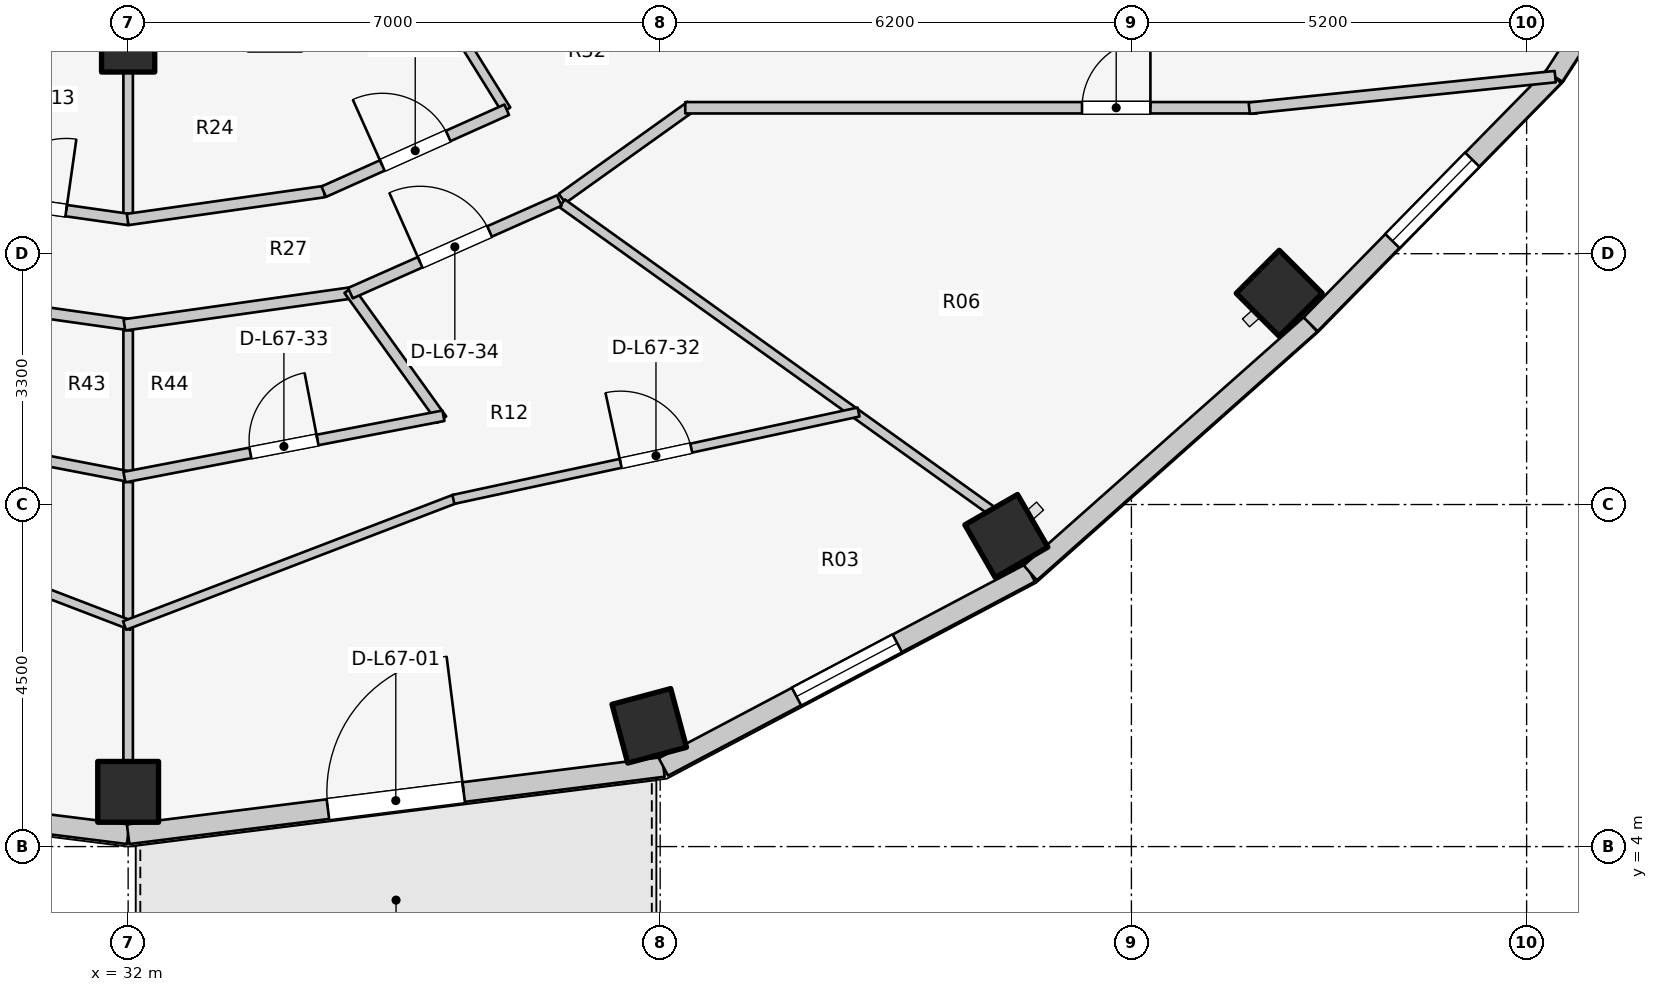
"""IFC4 building model, lengths in metres.
Left out: names, types, materials, properties, quantities, classifications, styles, units other than length and angle.
Written with IfcOpenShell. Run it as: python <this file> out.ifc"""

import sys

from ifc_helpers import new_model, si_unit, direction, frame, frame_2d, origin, origin_2d, place, context, subcontext, project, spatial, rectangle, extrude, element, fill, save


model = new_model("IFC4")
c1 = context("Model", 3, precision=1e-05, world=origin(), true_north=direction((0.0, 1.0)))
c2 = subcontext(c1, "Body", "Model", "MODEL_VIEW")
j1 = project(units=[si_unit("LENGTHUNIT", "METRE"), si_unit("PLANEANGLEUNIT", "RADIAN")], contexts=[c1])
p1 = place(None, origin())
s1 = spatial("IfcSite", under=j1, at=p1, CompositionType="ELEMENT")
p2 = place(p1, origin())
s2 = spatial("IfcBuilding", under=s1, at=p2, CompositionType="ELEMENT")
p3 = place(p2, frame((0.0, 0.0, 220.2)))
s3 = spatial("IfcBuildingStorey", under=s2, at=p3, CompositionType="ELEMENT", Elevation=220.2)
p4 = place(p3, frame((32.0, 14.54, 0.0), z_axis=(0.0, 0.0, 1.0), x_axis=(1.0, 0.0, 0.0)))
e1 = element("IfcColumn", 1, at=p4, inside=s3, PredefinedType="COLUMN", context=c2, shape_type="SweptSolid", body=[
    extrude(rectangle(XDim=0.7, YDim=0.7, at=origin_2d()), origin(), (0.0, 0.0, 1.0), 3.1),
])
for number, where, z_axis, x_axis in (
    (2, (32.0, 4.72, 0.0), (0.0, 0.0, 1.0), (0.0, -1.0, 0.0)),
    (3, (38.856, 5.589, 0.0), (0.0, 0.0, 1.0), (0.259, -0.966, 0.0)),
    (4, (43.555, 8.086, 0.0), (0.0, 0.0, 1.0), (0.5, -0.866, 0.0)),
    (5, (47.145, 11.279, 0.0), (0.0, 0.0, 1.0), (0.707, -0.707, 0.0)),
):
    element("IfcColumn", number, at=place(p3, frame(where, z_axis=z_axis, x_axis=x_axis)), inside=s3, PredefinedType="COLUMN", context=c2, shape_type="SweptSolid", body=[
        extrude(rectangle(XDim=0.8, YDim=0.8, at=origin_2d()), origin(), (0.0, 0.0, 1.0), 3.1),
    ])
p5 = place(p3, frame((24.957, 5.048, 0.0), z_axis=(0.0, 0.0, 1.0), x_axis=(0.992180211307, -0.124813574142, 0.0)))
e6 = element("IfcWall", 6, at=p5, inside=s3, PredefinedType="STANDARD", context=c2, shape_type="SweptSolid", body=[
    extrude(rectangle(XDim=7.098, YDim=0.26, at=frame_2d((3.549, 0.0))), origin(), (0.0, 0.0, 1.0), 2.85),
])
p6 = place(p5, frame((2.349, 0.0, 0.75)))
e7 = element("IfcOpeningElement", 7, at=p6, cuts=e6, PredefinedType="OPENING", context=c2, shape_type="SweptSolid", body=[
    extrude(rectangle(XDim=2.4, YDim=1.7, at=frame_2d((1.2, 0.85))), frame((0.0, 0.14, 0.0), z_axis=(0.0, -1.0, 0.0), x_axis=(1.0, 0.0, 0.0)), (0.0, 0.0, 1.0), 0.28),
])
p7 = place(p3, frame((32.0, 4.162, 0.0), z_axis=(0.0, 0.0, 1.0), x_axis=(0.992180211307, 0.124813574142, 0.0)))
e8 = element("IfcWall", 8, at=p7, inside=s3, PredefinedType="STANDARD", context=c2, shape_type="SweptSolid", body=[
    extrude(rectangle(XDim=7.098, YDim=0.26, at=frame_2d((3.549, 0.0))), origin(), (0.0, 0.0, 1.0), 2.88),
])
p8 = place(p7, frame((2.649, 0.0, 0.0)))
e9 = element("IfcOpeningElement", 9, at=p8, cuts=e8, PredefinedType="OPENING", context=c2, shape_type="SweptSolid", body=[
    extrude(rectangle(XDim=1.8, YDim=2.35, at=frame_2d((0.9, 1.175))), frame((0.0, 0.14, 0.0), z_axis=(0.0, -1.0, 0.0), x_axis=(1.0, 0.0, 0.0)), (0.0, 0.0, 1.0), 0.28),
])
p9 = place(p3, frame((39.043, 5.048, 0.0), z_axis=(0.0, 0.0, 1.0), x_axis=(0.884000981341, 0.46748504253, 0.0)))
e10 = element("IfcWall", 10, at=p9, inside=s3, PredefinedType="STANDARD", context=c2, shape_type="SweptSolid", body=[
    extrude(rectangle(XDim=5.46, YDim=0.26, at=frame_2d((2.73, 0.0))), origin(), (0.0, 0.0, 1.0), 2.85),
])
p10 = place(p9, frame((1.98, 0.0, 0.75)))
e11 = element("IfcOpeningElement", 11, at=p10, cuts=e10, PredefinedType="OPENING", context=c2, shape_type="SweptSolid", body=[
    extrude(rectangle(XDim=1.5, YDim=1.6, at=frame_2d((0.75, 0.8))), frame((0.0, 0.14, 0.0), z_axis=(0.0, -1.0, 0.0), x_axis=(1.0, 0.0, 0.0)), (0.0, 0.0, 1.0), 0.28),
])
p11 = place(p3, frame((43.87, 7.601, 0.0), z_axis=(0.0, 0.0, 1.0), x_axis=(0.748165854006, 0.663511759428, 0.0)))
e12 = element("IfcWall", 12, at=p11, inside=s3, PredefinedType="STANDARD", context=c2, shape_type="SweptSolid", body=[
    extrude(rectangle(XDim=4.929, YDim=0.26, at=frame_2d((2.464, 0.0))), origin(), (0.0, 0.0, 1.0), 2.85),
])
p12 = place(p3, frame((47.558, 10.871, 0.0), z_axis=(0.0, 0.0, 1.0), x_axis=(0.700642973333, 0.713512034881, 0.0)))
e13 = element("IfcWall", 13, at=p12, inside=s3, PredefinedType="STANDARD", context=c2, shape_type="SweptSolid", body=[
    extrude(rectangle(XDim=4.572, YDim=0.26, at=frame_2d((2.286, 0.0))), origin(), (0.0, 0.0, 1.0), 2.85),
])
p13 = place(p12, frame((1.536, 0.0, 0.75)))
e14 = element("IfcOpeningElement", 14, at=p13, cuts=e13, PredefinedType="OPENING", context=c2, shape_type="SweptSolid", body=[
    extrude(rectangle(XDim=1.5, YDim=1.6, at=frame_2d((0.75, 0.8))), frame((0.0, 0.14, 0.0), z_axis=(0.0, -1.0, 0.0), x_axis=(1.0, 0.0, 0.0)), (0.0, 0.0, 1.0), 0.28),
])
p14 = place(p3, frame((50.761, 14.133, 0.0), z_axis=(0.0, 0.0, 1.0), x_axis=(0.542641766008, 0.839964233634, 0.0)))
e15 = element("IfcWall", 15, at=p14, inside=s3, PredefinedType="STANDARD", context=c2, shape_type="SweptSolid", body=[
    extrude(rectangle(XDim=4.319, YDim=0.26, at=frame_2d((2.16, 0.0))), origin(), (0.0, 0.0, 1.0), 2.85),
])
p15 = place(p14, frame((1.41, 0.0, 0.75)))
e16 = element("IfcOpeningElement", 16, at=p15, cuts=e15, PredefinedType="OPENING", context=c2, shape_type="SweptSolid", body=[
    extrude(rectangle(XDim=1.5, YDim=1.6, at=frame_2d((0.75, 0.8))), frame((0.0, 0.14, 0.0), z_axis=(0.0, -1.0, 0.0), x_axis=(1.0, 0.0, 0.0)), (0.0, 0.0, 1.0), 0.28),
])
p16 = place(p3, frame((32.0, 14.9, 0.0), z_axis=(0.0, 0.0, 1.0), x_axis=(0.0, -1.0, 0.0)))
e17 = element("IfcWall", 17, at=p16, inside=s3, PredefinedType="PARTITIONING", context=c2, shape_type="SweptSolid", body=[
    extrude(rectangle(XDim=2.65, YDim=0.125, at=frame_2d((1.325, 0.0))), origin(), (0.0, 0.0, 1.0), 2.376),
])
p17 = place(p3, frame((35.55, 15.985, 0.0), z_axis=(0.0, 0.0, 1.0), x_axis=(0.527527080983, -0.849538215049, 0.0)))
e18 = element("IfcWall", 18, at=p17, inside=s3, PredefinedType="PARTITIONING", context=c2, shape_type="SweptSolid", body=[
    extrude(rectangle(XDim=2.701, YDim=0.125, at=frame_2d((1.351, 0.0))), origin(), (0.0, 0.0, 1.0), 2.376),
])
p18 = place(p3, frame((29.423, 12.617, 0.0), z_axis=(0.0, 0.0, 1.0), x_axis=(0.990078185178, -0.140517569133, 0.0)))
e19 = element("IfcWall", 19, at=p18, inside=s3, PredefinedType="PARTITIONING", context=c2, shape_type="SweptSolid", body=[
    extrude(rectangle(XDim=2.61, YDim=0.15, at=frame_2d((1.305, 0.0))), origin(), (0.0, 0.0, 1.0), 2.376),
])
p19 = place(p18, frame((0.83, 0.0, 0.0)))
e20 = element("IfcOpeningElement", 20, at=p19, cuts=e19, PredefinedType="OPENING", context=c2, shape_type="SweptSolid", body=[
    extrude(rectangle(XDim=0.95, YDim=2.1, at=frame_2d((0.475, 1.05))), frame((0.0, 0.085, 0.0), z_axis=(0.0, -1.0, 0.0), x_axis=(1.0, 0.0, 0.0)), (0.0, 0.0, 1.0), 0.17),
])
p20 = place(p3, frame((31.993, 12.25, 0.0), z_axis=(0.0, 0.0, 1.0), x_axis=(0.990078185178, 0.140517569133, 0.0)))
e21 = element("IfcWall", 21, at=p20, inside=s3, PredefinedType="PARTITIONING", context=c2, shape_type="SweptSolid", body=[
    extrude(rectangle(XDim=2.61, YDim=0.15, at=frame_2d((1.305, 0.0))), origin(), (0.0, 0.0, 1.0), 2.376),
])
p21 = place(p3, frame((34.573, 12.616, 0.0), z_axis=(0.0, 0.0, 1.0), x_axis=(0.912628408652, 0.408790151203, 0.0)))
e22 = element("IfcWall", 22, at=p21, inside=s3, PredefinedType="PARTITIONING", context=c2, shape_type="SweptSolid", body=[
    extrude(rectangle(XDim=2.638, YDim=0.15, at=frame_2d((1.319, 0.0))), origin(), (0.0, 0.0, 1.0), 2.376),
])
p22 = place(p21, frame((0.844, 0.0, 0.0)))
e23 = element("IfcOpeningElement", 23, at=p22, cuts=e22, PredefinedType="OPENING", context=c2, shape_type="SweptSolid", body=[
    extrude(rectangle(XDim=0.95, YDim=2.1, at=frame_2d((0.475, 1.05))), frame((0.0, 0.085, 0.0), z_axis=(0.0, -1.0, 0.0), x_axis=(1.0, 0.0, 0.0)), (0.0, 0.0, 1.0), 0.17),
])
p23 = place(p3, frame((37.71, 12.527, 0.0), z_axis=(0.0, 0.0, 1.0), x_axis=(0.813780999276, 0.581171648669, 0.0)))
e24 = element("IfcWall", 24, at=p23, inside=s3, PredefinedType="PARTITIONING", context=c2, shape_type="SweptSolid", body=[
    extrude(rectangle(XDim=2.082, YDim=0.15, at=frame_2d((1.041, 0.0))), origin(), (0.0, 0.0, 1.0), 2.376),
])
p24 = place(p3, frame((39.33, 13.72, 0.0), z_axis=(0.0, 0.0, 1.0), x_axis=(1.0, 0.0, 0.0)))
e25 = element("IfcWall", 25, at=p24, inside=s3, PredefinedType="PARTITIONING", context=c2, shape_type="SweptSolid", body=[
    extrude(rectangle(XDim=7.52, YDim=0.15, at=frame_2d((3.76, 0.0))), origin(), (0.0, 0.0, 1.0), 2.376),
])
p25 = place(p24, frame((5.22, 0.0, 0.0)))
e26 = element("IfcOpeningElement", 26, at=p25, cuts=e25, PredefinedType="OPENING", context=c2, shape_type="SweptSolid", body=[
    extrude(rectangle(XDim=0.9, YDim=2.1, at=frame_2d((0.45, 1.05))), frame((0.0, 0.085, 0.0), z_axis=(0.0, -1.0, 0.0), x_axis=(1.0, 0.0, 0.0)), (0.0, 0.0, 1.0), 0.17),
])
p26 = place(p3, frame((46.75, 13.715, 0.0), z_axis=(0.0, 0.0, 1.0), x_axis=(0.994734711466, 0.102483431859, 0.0)))
e27 = element("IfcWall", 27, at=p26, inside=s3, PredefinedType="PARTITIONING", context=c2, shape_type="SweptSolid", body=[
    extrude(rectangle(XDim=4.047, YDim=0.15, at=frame_2d((2.024, 0.0))), origin(), (0.0, 0.0, 1.0), 2.22),
])
p27 = place(p3, frame((32.0, 10.815, 0.0), z_axis=(0.0, 0.0, 1.0), x_axis=(0.0, -1.0, 0.0)))
e28 = element("IfcWall", 28, at=p27, inside=s3, PredefinedType="PARTITIONING", context=c2, shape_type="SweptSolid", body=[
    extrude(rectangle(XDim=5.715, YDim=0.125, at=frame_2d((2.857, 0.0))), origin(), (0.0, 0.0, 1.0), 2.376),
])
p28 = place(p3, frame((37.71, 12.463, 0.0), z_axis=(0.0, 0.0, 1.0), x_axis=(0.813163816543, -0.582034885093, 0.0)))
e29 = element("IfcWall", 29, at=p28, inside=s3, PredefinedType="PARTITIONING", context=c2, shape_type="SweptSolid", body=[
    extrude(rectangle(XDim=6.955, YDim=0.125, at=frame_2d((3.477, 0.0))), origin(), (0.0, 0.0, 1.0), 2.376),
])
p29 = place(p3, frame((27.702, 8.573, 0.0), z_axis=(0.0, 0.0, 1.0), x_axis=(0.933766866443, -0.357881878744, 0.0)))
e30 = element("IfcWall", 30, at=p29, inside=s3, PredefinedType="MOVABLE", context=c2, shape_type="SweptSolid", body=[
    extrude(rectangle(XDim=4.653, YDim=0.12, at=frame_2d((2.327, 0.0))), origin(), (0.0, 0.0, 1.0), 2.376),
])
p30 = place(p29, frame((1.852, 0.0, 0.0)))
e31 = element("IfcOpeningElement", 31, at=p30, cuts=e30, PredefinedType="OPENING", context=c2, shape_type="SweptSolid", body=[
    extrude(rectangle(XDim=0.95, YDim=2.1, at=frame_2d((0.475, 1.05))), frame((0.0, 0.07, 0.0), z_axis=(0.0, -1.0, 0.0), x_axis=(1.0, 0.0, 0.0)), (0.0, 0.0, 1.0), 0.14),
])
p31 = place(p3, frame((29.018, 11.29, 0.0), z_axis=(0.0, 0.0, 1.0), x_axis=(0.990214091671, -0.13955662885, 0.0)))
e32 = element("IfcWall", 32, at=p31, inside=s3, PredefinedType="PARTITIONING", context=c2, shape_type="SweptSolid", body=[
    extrude(rectangle(XDim=3.062, YDim=0.15, at=frame_2d((1.531, 0.0))), origin(), (0.0, 0.0, 1.0), 2.376),
])
p32 = place(p3, frame((27.852, 9.668, 0.0), z_axis=(0.0, 0.0, 1.0), x_axis=(0.98198484664, -0.188959680803, 0.0)))
e33 = element("IfcWall", 33, at=p32, inside=s3, PredefinedType="PLUMBINGWALL", context=c2, shape_type="SweptSolid", body=[
    extrude(rectangle(XDim=4.274, YDim=0.14, at=frame_2d((2.137, 0.0))), origin(), (0.0, 0.0, 1.0), 2.376),
])
p33 = place(p32, frame((1.687, 0.0, 0.0)))
e34 = element("IfcOpeningElement", 34, at=p33, cuts=e33, PredefinedType="OPENING", context=c2, shape_type="SweptSolid", body=[
    extrude(rectangle(XDim=0.9, YDim=2.1, at=frame_2d((0.45, 1.05))), frame((0.0, 0.08, 0.0), z_axis=(0.0, -1.0, 0.0), x_axis=(1.0, 0.0, 0.0)), (0.0, 0.0, 1.0), 0.16),
])
p34 = place(p3, frame((31.953, 6.908, 0.0), z_axis=(0.0, 0.0, 1.0), x_axis=(0.933766866443, 0.357881878744, 0.0)))
e35 = element("IfcWall", 35, at=p34, inside=s3, PredefinedType="MOVABLE", context=c2, shape_type="SweptSolid", body=[
    extrude(rectangle(XDim=4.653, YDim=0.12, at=frame_2d((2.327, 0.0))), origin(), (0.0, 0.0, 1.0), 2.376),
])
p35 = place(p3, frame((36.279, 8.567, 0.0), z_axis=(0.0, 0.0, 1.0), x_axis=(0.977534972695, 0.210773283785, 0.0)))
e36 = element("IfcWall", 36, at=p35, inside=s3, PredefinedType="MOVABLE", context=c2, shape_type="SweptSolid", body=[
    extrude(rectangle(XDim=5.453, YDim=0.12, at=frame_2d((2.727, 0.0))), origin(), (0.0, 0.0, 1.0), 2.376),
])
p36 = place(p35, frame((2.252, 0.0, 0.0)))
e37 = element("IfcOpeningElement", 37, at=p36, cuts=e36, PredefinedType="OPENING", context=c2, shape_type="SweptSolid", body=[
    extrude(rectangle(XDim=0.95, YDim=2.1, at=frame_2d((0.475, 1.05))), frame((0.0, 0.07, 0.0), z_axis=(0.0, -1.0, 0.0), x_axis=(1.0, 0.0, 0.0)), (0.0, 0.0, 1.0), 0.14),
])
p37 = place(p3, frame((31.95, 10.863, 0.0), z_axis=(0.0, 0.0, 1.0), x_axis=(0.990214091671, 0.13955662885, 0.0)))
e38 = element("IfcWall", 38, at=p37, inside=s3, PredefinedType="PARTITIONING", context=c2, shape_type="SweptSolid", body=[
    extrude(rectangle(XDim=3.062, YDim=0.15, at=frame_2d((1.531, 0.0))), origin(), (0.0, 0.0, 1.0), 2.376),
])
p38 = place(p3, frame((34.903, 11.324, 0.0), z_axis=(0.0, 0.0, 1.0), x_axis=(0.583259891741, -0.812285601673, 0.0)))
e39 = element("IfcWall", 39, at=p38, inside=s3, PredefinedType="PLUMBINGWALL", context=c2, shape_type="SweptSolid", body=[
    extrude(rectangle(XDim=2.1, YDim=0.14, at=frame_2d((1.05, 0.0))), origin(), (0.0, 0.0, 1.0), 2.385),
])
p39 = place(p3, frame((31.951, 8.861, 0.0), z_axis=(0.0, 0.0, 1.0), x_axis=(0.98198484664, 0.188959680803, 0.0)))
e40 = element("IfcWall", 40, at=p39, inside=s3, PredefinedType="PLUMBINGWALL", context=c2, shape_type="SweptSolid", body=[
    extrude(rectangle(XDim=4.274, YDim=0.14, at=frame_2d((2.137, 0.0))), origin(), (0.0, 0.0, 1.0), 2.376),
])
p40 = place(p39, frame((1.687, 0.0, 0.0)))
e41 = element("IfcOpeningElement", 41, at=p40, cuts=e40, PredefinedType="OPENING", context=c2, shape_type="SweptSolid", body=[
    extrude(rectangle(XDim=0.9, YDim=2.1, at=frame_2d((0.45, 1.05))), frame((0.0, 0.08, 0.0), z_axis=(0.0, -1.0, 0.0), x_axis=(1.0, 0.0, 0.0)), (0.0, 0.0, 1.0), 0.16),
])
p41 = place(p3, frame((34.925, 11.281, 0.0), z_axis=(0.0, 0.0, 1.0), x_axis=(0.914139569865, 0.405399613724, 0.0)))
e42 = element("IfcWall", 42, at=p41, inside=s3, PredefinedType="PARTITIONING", context=c2, shape_type="SweptSolid", body=[
    extrude(rectangle(XDim=3.005, YDim=0.15, at=frame_2d((1.502, 0.0))), origin(), (0.0, 0.0, 1.0), 2.376),
])
p42 = place(p41, frame((1.002, 0.0, 0.0)))
e43 = element("IfcOpeningElement", 43, at=p42, cuts=e42, PredefinedType="OPENING", context=c2, shape_type="SweptSolid", body=[
    extrude(rectangle(XDim=1.0, YDim=2.1, at=frame_2d((0.5, 1.05))), frame((0.0, 0.085, 0.0), z_axis=(0.0, -1.0, 0.0), x_axis=(1.0, 0.0, 0.0)), (0.0, 0.0, 1.0), 0.17),
])
p43 = place(p8, origin())
e44 = element("IfcDoor", 44, at=p43, inside=s3, OperationType="SINGLE_SWING_RIGHT", PredefinedType="DOOR", context=c2, shape_type="SweptSolid", body=[
    extrude(rectangle(XDim=1.8, YDim=2.35, at=frame_2d((0.9, 1.175))), frame((0.0, 0.025, 0.0), z_axis=(0.0, -1.0, 0.0), x_axis=(1.0, 0.0, 0.0)), (0.0, 0.0, 1.0), 0.05),
])
fill(e9, e44)
p44 = place(p10, origin())
e45 = element("IfcWindow", 45, at=p44, inside=s3, PartitioningType="SINGLE_PANEL", PredefinedType="WINDOW", context=c2, shape_type="SweptSolid", body=[
    extrude(rectangle(XDim=1.5, YDim=1.6, at=frame_2d((0.75, 0.8))), frame((0.0, 0.03, 0.0), z_axis=(0.0, -1.0, 0.0), x_axis=(1.0, 0.0, 0.0)), (0.0, 0.0, 1.0), 0.06),
])
fill(e11, e45)
p45 = place(p13, origin())
e46 = element("IfcWindow", 46, at=p45, inside=s3, PartitioningType="SINGLE_PANEL", PredefinedType="WINDOW", context=c2, shape_type="SweptSolid", body=[
    extrude(rectangle(XDim=1.5, YDim=1.6, at=frame_2d((0.75, 0.8))), frame((0.0, 0.03, 0.0), z_axis=(0.0, -1.0, 0.0), x_axis=(1.0, 0.0, 0.0)), (0.0, 0.0, 1.0), 0.06),
])
fill(e14, e46)
p46 = place(p19, origin())
e47 = element("IfcDoor", 47, at=p46, inside=s3, OperationType="SINGLE_SWING_RIGHT", PredefinedType="DOOR", context=c2, shape_type="SweptSolid", body=[
    extrude(rectangle(XDim=0.95, YDim=2.1, at=frame_2d((0.475, 1.05))), frame((0.0, 0.025, 0.0), z_axis=(0.0, -1.0, 0.0), x_axis=(1.0, 0.0, 0.0)), (0.0, 0.0, 1.0), 0.05),
])
fill(e20, e47)
p47 = place(p22, origin())
e48 = element("IfcDoor", 48, at=p47, inside=s3, OperationType="SINGLE_SWING_LEFT", PredefinedType="DOOR", context=c2, shape_type="SweptSolid", body=[
    extrude(rectangle(XDim=0.95, YDim=2.1, at=frame_2d((0.475, 1.05))), frame((0.0, 0.025, 0.0), z_axis=(0.0, -1.0, 0.0), x_axis=(1.0, 0.0, 0.0)), (0.0, 0.0, 1.0), 0.05),
])
fill(e23, e48)
p48 = place(p25, origin())
e49 = element("IfcDoor", 49, at=p48, inside=s3, OperationType="SINGLE_SWING_RIGHT", PredefinedType="DOOR", context=c2, shape_type="SweptSolid", body=[
    extrude(rectangle(XDim=0.9, YDim=2.1, at=frame_2d((0.45, 1.05))), frame((0.0, 0.025, 0.0), z_axis=(0.0, -1.0, 0.0), x_axis=(1.0, 0.0, 0.0)), (0.0, 0.0, 1.0), 0.05),
])
fill(e26, e49)
p49 = place(p36, origin())
e50 = element("IfcDoor", 50, at=p49, inside=s3, OperationType="SINGLE_SWING_LEFT", PredefinedType="DOOR", context=c2, shape_type="SweptSolid", body=[
    extrude(rectangle(XDim=0.95, YDim=2.1, at=frame_2d((0.475, 1.05))), frame((0.0, 0.025, 0.0), z_axis=(0.0, -1.0, 0.0), x_axis=(1.0, 0.0, 0.0)), (0.0, 0.0, 1.0), 0.05),
])
fill(e37, e50)
p50 = place(p40, origin())
e51 = element("IfcDoor", 51, at=p50, inside=s3, OperationType="SINGLE_SWING_RIGHT", PredefinedType="DOOR", context=c2, shape_type="SweptSolid", body=[
    extrude(rectangle(XDim=0.9, YDim=2.1, at=frame_2d((0.45, 1.05))), frame((0.0, 0.025, 0.0), z_axis=(0.0, -1.0, 0.0), x_axis=(1.0, 0.0, 0.0)), (0.0, 0.0, 1.0), 0.05),
])
fill(e41, e51)
p51 = place(p42, origin())
e52 = element("IfcDoor", 52, at=p51, inside=s3, OperationType="SINGLE_SWING_LEFT", PredefinedType="DOOR", context=c2, shape_type="SweptSolid", body=[
    extrude(rectangle(XDim=1.0, YDim=2.1, at=frame_2d((0.5, 1.05))), frame((0.0, 0.025, 0.0), z_axis=(0.0, -1.0, 0.0), x_axis=(1.0, 0.0, 0.0)), (0.0, 0.0, 1.0), 0.05),
])
fill(e43, e52)
save(model, sys.argv[1])
